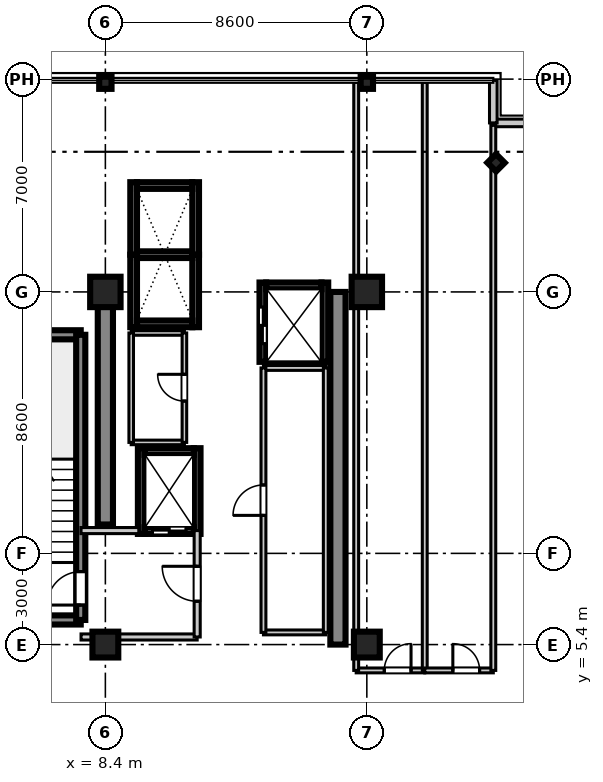
"""IFC4 building model, lengths in metres.
Left out: names, types, materials, properties, quantities, classifications, styles, units other than length and angle.
Written with IfcOpenShell. Run it as: python <this file> out.ifc"""

import sys

from ifc_helpers import new_model, si_unit, direction, frame, frame_2d, origin, origin_2d, place, context, subcontext, project, spatial, rectangle, i_section, extrude, source, transform, mapped, element, fill, save


model = new_model("IFC4")
c1 = context("Model", 3, precision=1e-05, world=origin(), true_north=direction((0.0, 1.0)))
c2 = subcontext(c1, "Body", "Model", "MODEL_VIEW")
j1 = project(units=[si_unit("LENGTHUNIT", "METRE"), si_unit("PLANEANGLEUNIT", "RADIAN")], contexts=[c1])
p1 = place(None, origin())
s1 = spatial("IfcSite", under=j1, at=p1, CompositionType="ELEMENT")
p2 = place(p1, origin())
s2 = spatial("IfcBuilding", under=s1, at=p2, CompositionType="ELEMENT")
p3 = place(p2, frame((0.0, 0.0, 227.1)))
s3 = spatial("IfcBuildingStorey", under=s2, at=p3, CompositionType="ELEMENT", Elevation=227.1)
m1 = source(origin(), c2, "Body", "SweptSolid", [
    extrude(rectangle(XDim=0.85, YDim=0.85, at=origin_2d()), origin(), (0.0, 0.0, 1.0), 3.655),
])
p4 = place(p3, frame((8.4, 5.4, 0.0), z_axis=(0.0, 0.0, 1.0), x_axis=(1.0, 0.0, 0.0)))
e1 = element("IfcColumn", 1, at=p4, inside=s3, PredefinedType="PILASTER", context=c2, shape_type="MappedRepresentation", body=[
    mapped(m1, transform((0.0, 0.0, 0.0), scale=1.0)),
])
m2 = source(origin(), c2, "Body", "SweptSolid", [
    extrude(rectangle(XDim=1.0, YDim=1.0, at=origin_2d()), origin(), (0.0, 0.0, 1.0), 3.655),
])
p5 = place(p3, frame((8.4, 17.0, 0.0), z_axis=(0.0, 0.0, 1.0), x_axis=(1.0, 0.0, 0.0)))
e2 = element("IfcColumn", 2, at=p5, inside=s3, PredefinedType="COLUMN", context=c2, shape_type="MappedRepresentation", body=[
    mapped(m2, transform((0.0, 0.0, 0.0), scale=1.0)),
])
p6 = place(p3, frame((17.0, 5.4, 0.0), z_axis=(0.0, 0.0, 1.0), x_axis=(1.0, 0.0, 0.0)))
e3 = element("IfcColumn", 3, at=p6, inside=s3, PredefinedType="PILASTER", context=c2, shape_type="MappedRepresentation", body=[
    mapped(m1, transform((0.0, 0.0, 0.0), scale=1.0)),
])
p7 = place(p3, frame((17.0, 17.0, 0.0), z_axis=(0.0, 0.0, 1.0), x_axis=(1.0, 0.0, 0.0)))
e4 = element("IfcColumn", 4, at=p7, inside=s3, PredefinedType="COLUMN", context=c2, shape_type="MappedRepresentation", body=[
    mapped(m2, transform((0.0, 0.0, 0.0), scale=1.0)),
])
m3 = source(origin(), c2, "Body", "SweptSolid", [
    extrude(i_section(OverallWidth=0.401, OverallDepth=0.406, WebThickness=0.016, FlangeThickness=0.025, at=origin_2d()), origin(), (0.0, 0.0, 1.0), 3.655),
])
for number, where, z_axis, x_axis in (
    (5, (8.4, 23.88, 0.0), (0.0, 0.0, 1.0), (0.0, 1.0, 0.0)),
    (6, (17.0, 23.88, 0.0), (0.0, 0.0, 1.0), (0.0, 1.0, 0.0)),
    (7, (21.25, 21.25, 0.0), (0.0, 0.0, 1.0), (0.707, 0.707, 0.0)),
):
    element("IfcColumn", number, at=place(p3, frame(where, z_axis=z_axis, x_axis=x_axis)), inside=s3, PredefinedType="COLUMN", context=c2, shape_type="MappedRepresentation", body=[
        mapped(m3, transform((0.0, 0.0, 0.0), scale=1.0)),
    ])
m4 = source(origin(), c2, "Body", "SweptSolid", [
    extrude(rectangle(XDim=7.65, YDim=0.5, at=frame_2d((3.825, 0.0))), origin(), (0.0, 0.0, 1.0), 3.41),
])
p8 = place(p3, frame((8.4, 9.35, 0.0), z_axis=(0.0, 0.0, 1.0), x_axis=(0.0, 1.0, 0.0)))
e8 = element("IfcWall", 8, at=p8, inside=s3, PredefinedType="SHEAR", context=c2, shape_type="MappedRepresentation", body=[
    mapped(m4, transform((0.0, 0.0, 0.0), scale=1.0)),
])
m5 = source(origin(), c2, "Body", "SweptSolid", [
    extrude(rectangle(XDim=11.6, YDim=0.5, at=frame_2d((5.8, 0.0))), origin(), (0.0, 0.0, 1.0), 3.41),
])
p9 = place(p3, frame((16.05, 5.4, 0.0), z_axis=(0.0, 0.0, 1.0), x_axis=(0.0, 1.0, 0.0)))
e9 = element("IfcWall", 9, at=p9, inside=s3, PredefinedType="SHEAR", context=c2, shape_type="MappedRepresentation", body=[
    mapped(m5, transform((0.0, 0.0, 0.0), scale=1.0)),
])
m6 = source(origin(), c2, "Body", "SweptSolid", [
    extrude(rectangle(XDim=3.98, YDim=0.3, at=frame_2d((1.99, 0.0))), origin(), (0.0, 0.0, 1.0), 3.41),
])
for number, where, z_axis, x_axis in (
    (10, (3.61, 6.21, 0.0), (0.0, 0.0, 1.0), (1.0, 0.0, 0.0)),
    (11, (3.61, 15.59, 0.0), (0.0, 0.0, 1.0), (1.0, 0.0, 0.0)),
):
    element("IfcWall", number, at=place(p3, frame(where, z_axis=z_axis, x_axis=x_axis)), inside=s3, PredefinedType="SHEAR", context=c2, shape_type="MappedRepresentation", body=[
        mapped(m6, transform((0.0, 0.0, 0.0), scale=1.0)),
    ])
m7 = source(origin(), c2, "Body", "SweptSolid", [
    extrude(rectangle(XDim=9.38, YDim=0.3, at=frame_2d((4.69, 0.0))), origin(), (0.0, 0.0, 1.0), 3.41),
])
p10 = place(p3, frame((7.59, 6.21, 0.0), z_axis=(0.0, 0.0, 1.0), x_axis=(0.0, 1.0, 0.0)))
e12 = element("IfcWall", 12, at=p10, inside=s3, PredefinedType="SHEAR", context=c2, shape_type="MappedRepresentation", body=[
    mapped(m7, transform((0.0, 0.0, 0.0), scale=1.0)),
])
p11 = place(p10, frame((0.49, 0.0, 0.0)))
e13 = element("IfcOpeningElement", 13, at=p11, cuts=e12, PredefinedType="OPENING", context=c2, shape_type="SweptSolid", body=[
    extrude(rectangle(XDim=1.1, YDim=2.15, at=frame_2d((0.55, 1.075))), frame((0.0, 0.16, 0.0), z_axis=(0.0, -1.0, 0.0), x_axis=(1.0, 0.0, 0.0)), (0.0, 0.0, 1.0), 0.32),
])
m8 = source(origin(), c2, "Body", "SweptSolid", [
    extrude(rectangle(XDim=2.385, YDim=0.22, at=frame_2d((1.192, 0.0))), origin(), (0.0, 0.0, 1.0), 3.41),
])
for number, where, z_axis, x_axis in (
    (14, (9.33, 15.84, 0.0), (0.0, 0.0, 1.0), (0.0, 1.0, 0.0)),
    (15, (11.37, 15.84, 0.0), (0.0, 0.0, 1.0), (0.0, 1.0, 0.0)),
):
    element("IfcWall", number, at=place(p3, frame(where, z_axis=z_axis, x_axis=x_axis)), inside=s3, PredefinedType="SHEAR", context=c2, shape_type="MappedRepresentation", body=[
        mapped(m8, transform((0.0, 0.0, 0.0), scale=1.0)),
    ])
m9 = source(origin(), c2, "Body", "SweptSolid", [
    extrude(rectangle(XDim=1.82, YDim=0.22, at=frame_2d((0.91, 0.0))), origin(), (0.0, 0.0, 1.0), 3.41),
])
p12 = place(p3, frame((9.44, 15.95, 0.0), z_axis=(0.0, 0.0, 1.0), x_axis=(1.0, 0.0, 0.0)))
e16 = element("IfcWall", 16, at=p12, inside=s3, PredefinedType="SHEAR", context=c2, shape_type="MappedRepresentation", body=[
    mapped(m9, transform((0.0, 0.0, 0.0), scale=1.0)),
])
m10 = source(origin(), c2, "Body", "SweptSolid", [
    extrude(rectangle(XDim=1.82, YDim=0.22, at=frame_2d((0.91, 0.0))), origin(), (0.0, 0.0, 1.0), 3.7),
])
p13 = place(p3, frame((9.44, 18.225, 0.0), z_axis=(0.0, 0.0, 1.0), x_axis=(1.0, 0.0, 0.0)))
e17 = element("IfcWall", 17, at=p13, inside=s3, PredefinedType="SHEAR", context=c2, shape_type="MappedRepresentation", body=[
    mapped(m10, transform((0.0, 0.0, 0.0), scale=1.0)),
])
for number, where, z_axis, x_axis in (
    (18, (9.33, 18.225, 0.0), (0.0, 0.0, 1.0), (0.0, 1.0, 0.0)),
    (19, (11.37, 18.225, 0.0), (0.0, 0.0, 1.0), (0.0, 1.0, 0.0)),
):
    element("IfcWall", number, at=place(p3, frame(where, z_axis=z_axis, x_axis=x_axis)), inside=s3, PredefinedType="SHEAR", context=c2, shape_type="MappedRepresentation", body=[
        mapped(m8, transform((0.0, 0.0, 0.0), scale=1.0)),
    ])
p14 = place(p3, frame((9.44, 20.5, 0.0), z_axis=(0.0, 0.0, 1.0), x_axis=(1.0, 0.0, 0.0)))
e20 = element("IfcWall", 20, at=p14, inside=s3, PredefinedType="SHEAR", context=c2, shape_type="MappedRepresentation", body=[
    mapped(m9, transform((0.0, 0.0, 0.0), scale=1.0)),
])
m11 = source(origin(), c2, "Body", "SweptSolid", [
    extrude(rectangle(XDim=2.82, YDim=0.22, at=frame_2d((1.41, 0.0))), origin(), (0.0, 0.0, 1.0), 3.41),
])
for number, where, z_axis, x_axis in (
    (21, (9.58, 9.04, 0.0), (0.0, 0.0, 1.0), (0.0, 1.0, 0.0)),
    (22, (11.42, 9.04, 0.0), (0.0, 0.0, 1.0), (0.0, 1.0, 0.0)),
):
    element("IfcWall", number, at=place(p3, frame(where, z_axis=z_axis, x_axis=x_axis)), inside=s3, PredefinedType="SHEAR", context=c2, shape_type="MappedRepresentation", body=[
        mapped(m11, transform((0.0, 0.0, 0.0), scale=1.0)),
    ])
m12 = source(origin(), c2, "Body", "SweptSolid", [
    extrude(rectangle(XDim=1.62, YDim=0.22, at=frame_2d((0.81, 0.0))), origin(), (0.0, 0.0, 1.0), 3.41),
])
p15 = place(p3, frame((9.69, 9.15, 0.0), z_axis=(0.0, 0.0, 1.0), x_axis=(1.0, 0.0, 0.0)))
e23 = element("IfcWall", 23, at=p15, inside=s3, PredefinedType="SHEAR", context=c2, shape_type="MappedRepresentation", body=[
    mapped(m12, transform((0.0, 0.0, 0.0), scale=1.0)),
])
p16 = place(p15, frame((0.26, 0.0, 0.0)))
e24 = element("IfcOpeningElement", 24, at=p16, cuts=e23, PredefinedType="OPENING", context=c2, shape_type="SweptSolid", body=[
    extrude(rectangle(XDim=1.1, YDim=2.2, at=frame_2d((0.55, 1.1))), frame((0.0, 0.12, 0.0), z_axis=(0.0, -1.0, 0.0), x_axis=(1.0, 0.0, 0.0)), (0.0, 0.0, 1.0), 0.24),
])
p17 = place(p3, frame((9.69, 11.75, 0.0), z_axis=(0.0, 0.0, 1.0), x_axis=(1.0, 0.0, 0.0)))
e25 = element("IfcWall", 25, at=p17, inside=s3, PredefinedType="SHEAR", context=c2, shape_type="MappedRepresentation", body=[
    mapped(m12, transform((0.0, 0.0, 0.0), scale=1.0)),
])
m13 = source(origin(), c2, "Body", "SweptSolid", [
    extrude(rectangle(XDim=2.61, YDim=0.22, at=frame_2d((1.305, 0.0))), origin(), (0.0, 0.0, 1.0), 3.41),
])
p18 = place(p3, frame((13.58, 14.7, 0.0), z_axis=(0.0, 0.0, 1.0), x_axis=(0.0, 1.0, 0.0)))
e26 = element("IfcWall", 26, at=p18, inside=s3, PredefinedType="SHEAR", context=c2, shape_type="MappedRepresentation", body=[
    mapped(m13, transform((0.0, 0.0, 0.0), scale=1.0)),
])
p19 = place(p18, frame((0.6, 0.0, 0.0)))
e27 = element("IfcOpeningElement", 27, at=p19, cuts=e26, PredefinedType="OPENING", context=c2, shape_type="SweptSolid", body=[
    extrude(rectangle(XDim=1.2, YDim=2.2, at=frame_2d((0.6, 1.1))), frame((0.0, 0.12, 0.0), z_axis=(0.0, -1.0, 0.0), x_axis=(1.0, 0.0, 0.0)), (0.0, 0.0, 1.0), 0.24),
])
p20 = place(p3, frame((15.62, 14.7, 0.0), z_axis=(0.0, 0.0, 1.0), x_axis=(0.0, 1.0, 0.0)))
e28 = element("IfcWall", 28, at=p20, inside=s3, PredefinedType="SHEAR", context=c2, shape_type="MappedRepresentation", body=[
    mapped(m13, transform((0.0, 0.0, 0.0), scale=1.0)),
])
p21 = place(p3, frame((13.69, 17.2, 0.0), z_axis=(0.0, 0.0, 1.0), x_axis=(1.0, 0.0, 0.0)))
e29 = element("IfcWall", 29, at=p21, inside=s3, PredefinedType="SHEAR", context=c2, shape_type="MappedRepresentation", body=[
    mapped(m9, transform((0.0, 0.0, 0.0), scale=1.0)),
])
m14 = source(origin(), c2, "Body", "SweptSolid", [
    extrude(rectangle(XDim=1.4, YDim=0.25, at=frame_2d((0.7, 0.0))), origin(), (0.0, 0.0, 1.0), 3.41),
])
p22 = place(p3, frame((21.16, 22.56, 0.0), z_axis=(0.0, 0.0, 1.0), x_axis=(1.0, 0.0, 0.0)))
e30 = element("IfcWall", 30, at=p22, inside=s3, PredefinedType="STANDARD", context=c2, shape_type="MappedRepresentation", body=[
    mapped(m14, transform((0.0, 0.0, 0.0), scale=1.0)),
])
m15 = source(origin(), c2, "Body", "SweptSolid", [
    extrude(rectangle(XDim=1.4, YDim=0.25, at=frame_2d((0.7, 0.0))), origin(), (0.0, 0.0, 1.0), 3.41),
])
p23 = place(p3, frame((21.16, 22.56, 0.0), z_axis=(0.0, 0.0, 1.0), x_axis=(0.0, 1.0, 0.0)))
e31 = element("IfcWall", 31, at=p23, inside=s3, PredefinedType="STANDARD", context=c2, shape_type="MappedRepresentation", body=[
    mapped(m15, transform((0.0, 0.0, 0.0), scale=1.0)),
])
m16 = source(origin(), c2, "Body", "SweptSolid", [
    extrude(rectangle(XDim=3.82, YDim=0.2, at=frame_2d((1.91, 0.0))), origin(), (0.0, 0.0, 1.0), 2.75),
])
p24 = place(p3, frame((7.6, 5.65, 0.0), z_axis=(0.0, 0.0, 1.0), x_axis=(1.0, 0.0, 0.0)))
e32 = element("IfcWall", 32, at=p24, inside=s3, PredefinedType="PARTITIONING", context=c2, shape_type="MappedRepresentation", body=[
    mapped(m16, transform((0.0, 0.0, 0.0), scale=1.0)),
])
m17 = source(origin(), c2, "Body", "SweptSolid", [
    extrude(rectangle(XDim=1.9, YDim=0.2, at=frame_2d((0.95, 0.0))), origin(), (0.0, 0.0, 1.0), 2.75),
])
p25 = place(p3, frame((7.6, 9.15, 0.0), z_axis=(0.0, 0.0, 1.0), x_axis=(1.0, 0.0, 0.0)))
e33 = element("IfcWall", 33, at=p25, inside=s3, PredefinedType="PARTITIONING", context=c2, shape_type="MappedRepresentation", body=[
    mapped(m17, transform((0.0, 0.0, 0.0), scale=1.0)),
])
m18 = source(origin(), c2, "Body", "SweptSolid", [
    extrude(rectangle(XDim=3.5, YDim=0.2, at=frame_2d((1.75, 0.0))), origin(), (0.0, 0.0, 1.0), 2.75),
])
p26 = place(p3, frame((11.42, 5.65, 0.0), z_axis=(0.0, 0.0, 1.0), x_axis=(0.0, 1.0, 0.0)))
e34 = element("IfcWall", 34, at=p26, inside=s3, PredefinedType="PARTITIONING", context=c2, shape_type="MappedRepresentation", body=[
    mapped(m18, transform((0.0, 0.0, 0.0), scale=1.0)),
])
p27 = place(p26, frame((1.175, 0.0, 0.0)))
e35 = element("IfcOpeningElement", 35, at=p27, cuts=e34, PredefinedType="OPENING", context=c2, shape_type="SweptSolid", body=[
    extrude(rectangle(XDim=1.15, YDim=2.15, at=frame_2d((0.575, 1.075))), frame((0.0, 0.11, 0.0), z_axis=(0.0, -1.0, 0.0), x_axis=(1.0, 0.0, 0.0)), (0.0, 0.0, 1.0), 0.22),
])
m19 = source(origin(), c2, "Body", "SweptSolid", [
    extrude(rectangle(XDim=1.75, YDim=0.15, at=frame_2d((0.875, 0.0))), origin(), (0.0, 0.0, 1.0), 2.75),
])
for number, where, z_axis, x_axis in (
    (36, (9.25, 12.05, 0.0), (0.0, 0.0, 1.0), (1.0, 0.0, 0.0)),
    (37, (9.25, 15.65, 0.0), (0.0, 0.0, 1.0), (1.0, 0.0, 0.0)),
):
    element("IfcWall", number, at=place(p3, frame(where, z_axis=z_axis, x_axis=x_axis)), inside=s3, PredefinedType="PARTITIONING", context=c2, shape_type="MappedRepresentation", body=[
        mapped(m19, transform((0.0, 0.0, 0.0), scale=1.0)),
    ])
m20 = source(origin(), c2, "Body", "SweptSolid", [
    extrude(rectangle(XDim=3.6, YDim=0.15, at=frame_2d((1.8, 0.0))), origin(), (0.0, 0.0, 1.0), 2.75),
])
p28 = place(p3, frame((9.25, 12.05, 0.0), z_axis=(0.0, 0.0, 1.0), x_axis=(0.0, 1.0, 0.0)))
e38 = element("IfcWall", 38, at=p28, inside=s3, PredefinedType="PARTITIONING", context=c2, shape_type="MappedRepresentation", body=[
    mapped(m20, transform((0.0, 0.0, 0.0), scale=1.0)),
])
p29 = place(p3, frame((11.0, 12.05, 0.0), z_axis=(0.0, 0.0, 1.0), x_axis=(0.0, 1.0, 0.0)))
e39 = element("IfcWall", 39, at=p29, inside=s3, PredefinedType="PARTITIONING", context=c2, shape_type="MappedRepresentation", body=[
    mapped(m20, transform((0.0, 0.0, 0.0), scale=1.0)),
])
p30 = place(p29, frame((1.36, 0.0, 0.0)))
e40 = element("IfcOpeningElement", 40, at=p30, cuts=e39, PredefinedType="OPENING", context=c2, shape_type="SweptSolid", body=[
    extrude(rectangle(XDim=0.88, YDim=2.1, at=frame_2d((0.44, 1.05))), frame((0.0, 0.085, 0.0), z_axis=(0.0, -1.0, 0.0), x_axis=(1.0, 0.0, 0.0)), (0.0, 0.0, 1.0), 0.17),
])
m21 = source(origin(), c2, "Body", "SweptSolid", [
    extrude(rectangle(XDim=2.05, YDim=0.16, at=frame_2d((1.025, 0.0))), origin(), (0.0, 0.0, 1.0), 2.75),
])
for number, where, z_axis, x_axis in (
    (41, (13.6, 5.8, 0.0), (0.0, 0.0, 1.0), (1.0, 0.0, 0.0)),
    (42, (13.6, 14.5, 0.0), (0.0, 0.0, 1.0), (1.0, 0.0, 0.0)),
):
    element("IfcWall", number, at=place(p3, frame(where, z_axis=z_axis, x_axis=x_axis)), inside=s3, PredefinedType="PARTITIONING", context=c2, shape_type="MappedRepresentation", body=[
        mapped(m21, transform((0.0, 0.0, 0.0), scale=1.0)),
    ])
m22 = source(origin(), c2, "Body", "SweptSolid", [
    extrude(rectangle(XDim=8.7, YDim=0.16, at=frame_2d((4.35, 0.0))), origin(), (0.0, 0.0, 1.0), 2.75),
])
p31 = place(p3, frame((13.6, 5.8, 0.0), z_axis=(0.0, 0.0, 1.0), x_axis=(0.0, 1.0, 0.0)))
e43 = element("IfcWall", 43, at=p31, inside=s3, PredefinedType="PARTITIONING", context=c2, shape_type="MappedRepresentation", body=[
    mapped(m22, transform((0.0, 0.0, 0.0), scale=1.0)),
])
p32 = place(p31, frame((3.85, 0.0, 0.0)))
e44 = element("IfcOpeningElement", 44, at=p32, cuts=e43, PredefinedType="OPENING", context=c2, shape_type="SweptSolid", body=[
    extrude(rectangle(XDim=1.0, YDim=2.1, at=frame_2d((0.5, 1.05))), frame((0.0, 0.09, 0.0), z_axis=(0.0, -1.0, 0.0), x_axis=(1.0, 0.0, 0.0)), (0.0, 0.0, 1.0), 0.18),
])
p33 = place(p3, frame((15.65, 5.8, 0.0), z_axis=(0.0, 0.0, 1.0), x_axis=(0.0, 1.0, 0.0)))
e45 = element("IfcWall", 45, at=p33, inside=s3, PredefinedType="PARTITIONING", context=c2, shape_type="MappedRepresentation", body=[
    mapped(m22, transform((0.0, 0.0, 0.0), scale=1.0)),
])
m23 = source(origin(), c2, "Body", "SweptSolid", [
    extrude(rectangle(XDim=2.255, YDim=0.16, at=frame_2d((1.127, 0.0))), origin(), (0.0, 0.0, 1.0), 2.75),
])
p34 = place(p3, frame((16.65, 4.55, 0.0), z_axis=(0.0, 0.0, 1.0), x_axis=(1.0, 0.0, 0.0)))
e46 = element("IfcWall", 46, at=p34, inside=s3, PredefinedType="PARTITIONING", context=c2, shape_type="MappedRepresentation", body=[
    mapped(m23, transform((0.0, 0.0, 0.0), scale=1.0)),
])
p35 = place(p34, frame((0.924, 0.0, 0.0)))
e47 = element("IfcOpeningElement", 47, at=p35, cuts=e46, PredefinedType="OPENING", context=c2, shape_type="SweptSolid", body=[
    extrude(rectangle(XDim=0.88, YDim=2.1, at=frame_2d((0.44, 1.05))), frame((0.0, 0.09, 0.0), z_axis=(0.0, -1.0, 0.0), x_axis=(1.0, 0.0, 0.0)), (0.0, 0.0, 1.0), 0.18),
])
m24 = source(origin(), c2, "Body", "SweptSolid", [
    extrude(rectangle(XDim=19.35, YDim=0.16, at=frame_2d((9.675, 0.0))), origin(), (0.0, 0.0, 1.0), 2.75),
])
for number, where, z_axis, x_axis in (
    (48, (16.65, 4.55, 0.0), (0.0, 0.0, 1.0), (0.0, 1.0, 0.0)),
    (49, (18.905, 4.55, 0.0), (0.0, 0.0, 1.0), (0.0, 1.0, 0.0)),
):
    element("IfcWall", number, at=place(p3, frame(where, z_axis=z_axis, x_axis=x_axis)), inside=s3, PredefinedType="PARTITIONING", context=c2, shape_type="MappedRepresentation", body=[
        mapped(m24, transform((0.0, 0.0, 0.0), scale=1.0)),
    ])
m25 = source(origin(), c2, "Body", "SweptSolid", [
    extrude(rectangle(XDim=2.255, YDim=0.16, at=frame_2d((1.127, 0.0))), origin(), (0.0, 0.0, 1.0), 2.75),
])
p36 = place(p3, frame((18.905, 4.55, 0.0), z_axis=(0.0, 0.0, 1.0), x_axis=(1.0, 0.0, 0.0)))
e50 = element("IfcWall", 50, at=p36, inside=s3, PredefinedType="PARTITIONING", context=c2, shape_type="MappedRepresentation", body=[
    mapped(m25, transform((0.0, 0.0, 0.0), scale=1.0)),
])
p37 = place(p36, frame((0.924, 0.0, 0.0)))
e51 = element("IfcOpeningElement", 51, at=p37, cuts=e50, PredefinedType="OPENING", context=c2, shape_type="SweptSolid", body=[
    extrude(rectangle(XDim=0.88, YDim=2.1, at=frame_2d((0.44, 1.05))), frame((0.0, 0.09, 0.0), z_axis=(0.0, -1.0, 0.0), x_axis=(1.0, 0.0, 0.0)), (0.0, 0.0, 1.0), 0.18),
])
m26 = source(origin(), c2, "Body", "SweptSolid", [
    extrude(rectangle(XDim=17.93, YDim=0.16, at=frame_2d((8.965, 0.0))), origin(), (0.0, 0.0, 1.0), 2.75),
])
p38 = place(p3, frame((21.16, 4.55, 0.0), z_axis=(0.0, 0.0, 1.0), x_axis=(0.0, 1.0, 0.0)))
e52 = element("IfcWall", 52, at=p38, inside=s3, PredefinedType="PARTITIONING", context=c2, shape_type="MappedRepresentation", body=[
    mapped(m26, transform((0.0, 0.0, 0.0), scale=1.0)),
])
m27 = source(origin(), c2, "Body", "SweptSolid", [
    extrude(rectangle(XDim=1.1, YDim=2.15, at=frame_2d((0.55, 1.075))), frame((0.0, 0.025, 0.0), z_axis=(0.0, -1.0, 0.0), x_axis=(1.0, 0.0, 0.0)), (0.0, 0.0, 1.0), 0.05),
])
p39 = place(p11, origin())
e53 = element("IfcDoor", 53, at=p39, inside=s3, OperationType="SINGLE_SWING_LEFT", PredefinedType="DOOR", context=c2, shape_type="MappedRepresentation", body=[
    mapped(m27, transform((0.0, 0.0, 0.0), scale=1.0)),
])
fill(e13, e53)
m28 = source(origin(), c2, "Body", "SweptSolid", [
    extrude(rectangle(XDim=1.1, YDim=2.2, at=frame_2d((0.55, 1.1))), frame((0.0, 0.025, 0.0), z_axis=(0.0, -1.0, 0.0), x_axis=(1.0, 0.0, 0.0)), (0.0, 0.0, 1.0), 0.05),
])
p40 = place(p16, frame((1.1, 0.0, 0.0), z_axis=(0.0, 0.0, 1.0), x_axis=(-1.0, 0.0, 0.0)))
e54 = element("IfcDoor", 54, at=p40, inside=s3, OperationType="DOUBLE_DOOR_SLIDING", PredefinedType="DOOR", context=c2, shape_type="MappedRepresentation", body=[
    mapped(m28, transform((0.0, 0.0, 0.0), scale=1.0)),
])
fill(e24, e54)
m29 = source(origin(), c2, "Body", "SweptSolid", [
    extrude(rectangle(XDim=1.2, YDim=2.2, at=frame_2d((0.6, 1.1))), frame((0.0, 0.025, 0.0), z_axis=(0.0, -1.0, 0.0), x_axis=(1.0, 0.0, 0.0)), (0.0, 0.0, 1.0), 0.05),
])
p41 = place(p19, origin())
e55 = element("IfcDoor", 55, at=p41, inside=s3, OperationType="DOUBLE_DOOR_SLIDING", PredefinedType="DOOR", context=c2, shape_type="MappedRepresentation", body=[
    mapped(m29, transform((0.0, 0.0, 0.0), scale=1.0)),
])
fill(e27, e55)
m30 = source(origin(), c2, "Body", "SweptSolid", [
    extrude(rectangle(XDim=1.15, YDim=2.15, at=frame_2d((0.575, 1.075))), frame((0.0, 0.025, 0.0), z_axis=(0.0, -1.0, 0.0), x_axis=(1.0, 0.0, 0.0)), (0.0, 0.0, 1.0), 0.05),
])
p42 = place(p27, frame((1.15, 0.0, 0.0), z_axis=(0.0, 0.0, 1.0), x_axis=(-1.0, 0.0, 0.0)))
e56 = element("IfcDoor", 56, at=p42, inside=s3, OperationType="SINGLE_SWING_RIGHT", PredefinedType="DOOR", context=c2, shape_type="MappedRepresentation", body=[
    mapped(m30, transform((0.0, 0.0, 0.0), scale=1.0)),
])
fill(e35, e56)
m31 = source(origin(), c2, "Body", "SweptSolid", [
    extrude(rectangle(XDim=0.88, YDim=2.1, at=frame_2d((0.44, 1.05))), frame((0.0, 0.025, 0.0), z_axis=(0.0, -1.0, 0.0), x_axis=(1.0, 0.0, 0.0)), (0.0, 0.0, 1.0), 0.05),
])
p43 = place(p30, origin())
e57 = element("IfcDoor", 57, at=p43, inside=s3, OperationType="SINGLE_SWING_RIGHT", PredefinedType="DOOR", context=c2, shape_type="MappedRepresentation", body=[
    mapped(m31, transform((0.0, 0.0, 0.0), scale=1.0)),
])
fill(e40, e57)
m32 = source(origin(), c2, "Body", "SweptSolid", [
    extrude(rectangle(XDim=1.0, YDim=2.1, at=frame_2d((0.5, 1.05))), frame((0.0, 0.025, 0.0), z_axis=(0.0, -1.0, 0.0), x_axis=(1.0, 0.0, 0.0)), (0.0, 0.0, 1.0), 0.05),
])
p44 = place(p32, frame((1.0, 0.0, 0.0), z_axis=(0.0, 0.0, 1.0), x_axis=(-1.0, 0.0, 0.0)))
e58 = element("IfcDoor", 58, at=p44, inside=s3, OperationType="SINGLE_SWING_LEFT", PredefinedType="DOOR", context=c2, shape_type="MappedRepresentation", body=[
    mapped(m32, transform((0.0, 0.0, 0.0), scale=1.0)),
])
fill(e44, e58)
p45 = place(p35, origin())
e59 = element("IfcDoor", 59, at=p45, inside=s3, OperationType="SINGLE_SWING_RIGHT", PredefinedType="DOOR", context=c2, shape_type="MappedRepresentation", body=[
    mapped(m31, transform((0.0, 0.0, 0.0), scale=1.0)),
])
fill(e47, e59)
p46 = place(p37, origin())
e60 = element("IfcDoor", 60, at=p46, inside=s3, OperationType="SINGLE_SWING_LEFT", PredefinedType="DOOR", context=c2, shape_type="MappedRepresentation", body=[
    mapped(m31, transform((0.0, 0.0, 0.0), scale=1.0)),
])
fill(e51, e60)
save(model, sys.argv[1])
